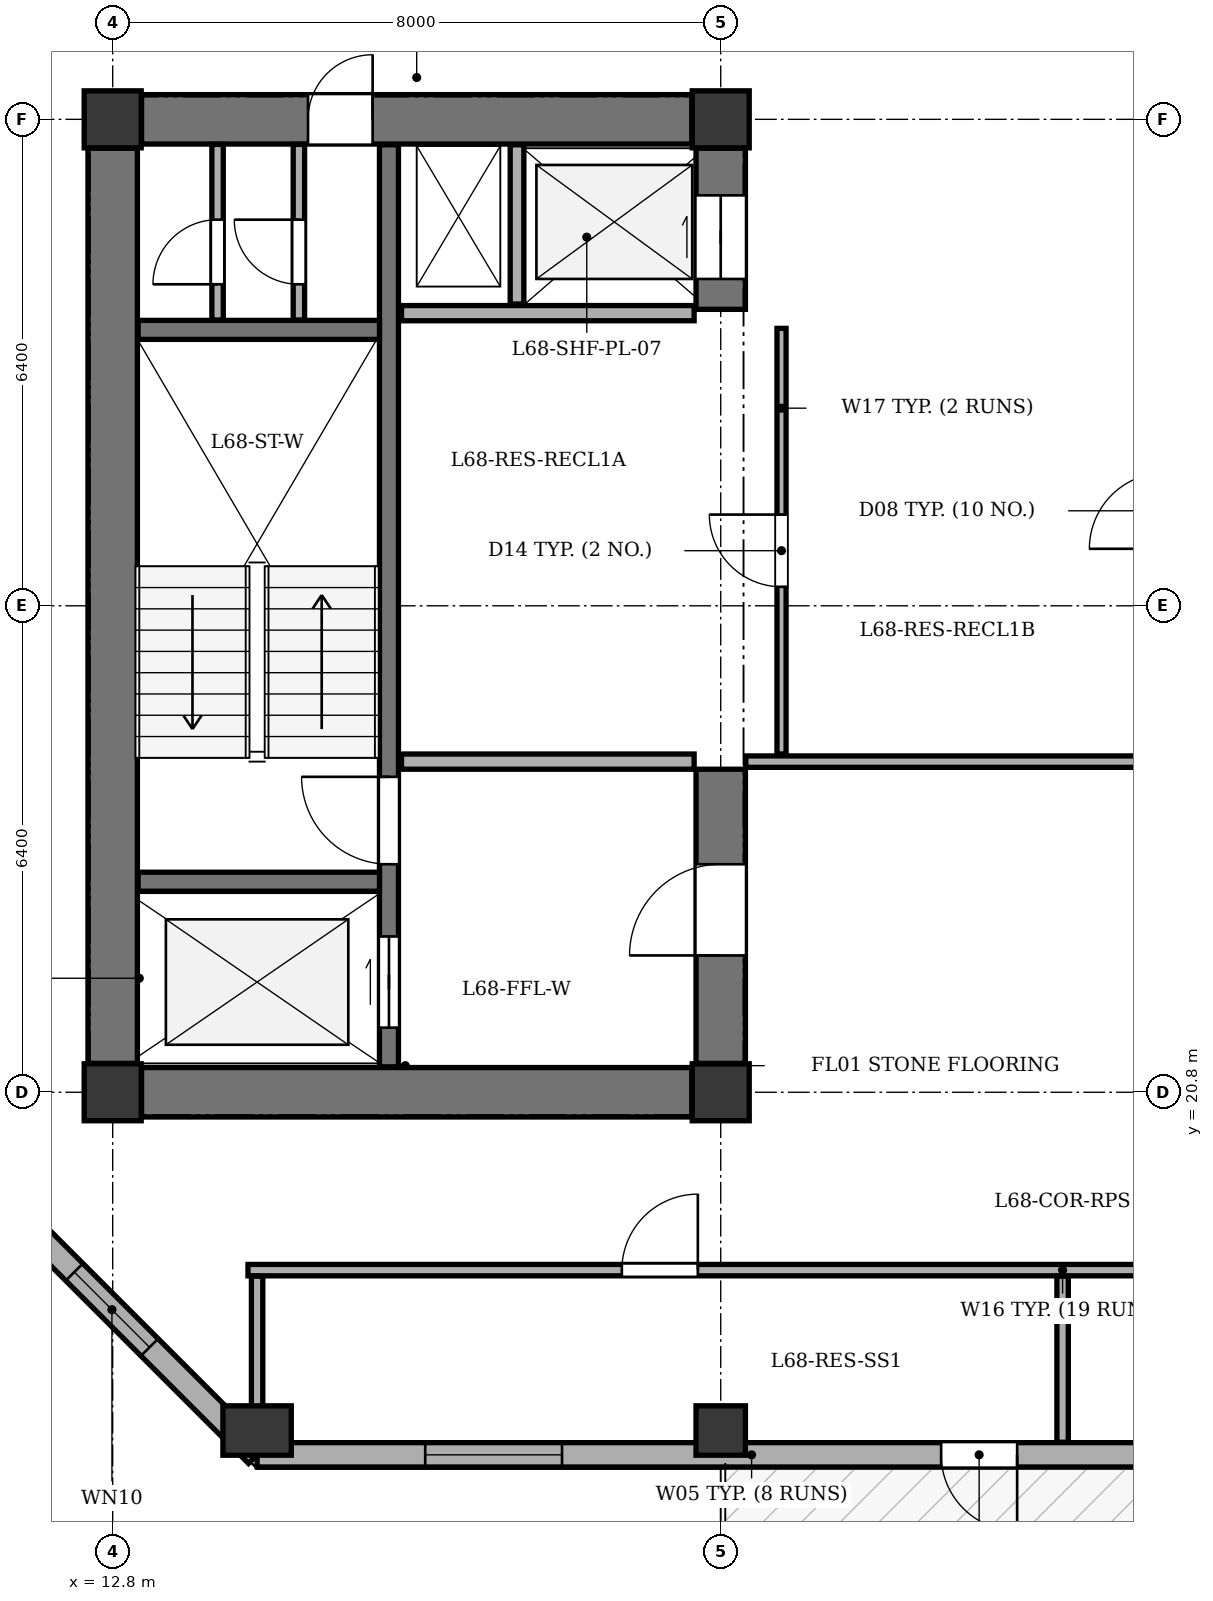
"""IFC4 building model, lengths in metres.
Left out: names, types, materials, properties, quantities, classifications, styles, units other than length and angle.
Written with IfcOpenShell. Run it as: python <this file> out.ifc"""

import sys

from ifc_helpers import new_model, si_unit, direction, frame, frame_2d, origin, origin_2d, place, context, subcontext, project, spatial, rectangle, extrude, element, fill, save


model = new_model("IFC4")
c1 = context("Model", 3, precision=1e-05, world=origin(), true_north=direction((0.0, 1.0)))
c2 = subcontext(c1, "Body", "Model", "MODEL_VIEW")
j1 = project(units=[si_unit("LENGTHUNIT", "METRE"), si_unit("PLANEANGLEUNIT", "RADIAN")], contexts=[c1])
p1 = place(None, origin())
s1 = spatial("IfcSite", under=j1, at=p1, CompositionType="ELEMENT")
p2 = place(p1, origin())
s2 = spatial("IfcBuilding", under=s1, at=p2, CompositionType="ELEMENT")
p3 = place(p2, frame((0.0, 0.0, 258.5)))
s3 = spatial("IfcBuildingStorey", under=s2, at=p3, CompositionType="ELEMENT", Elevation=258.5)
for number, where, z_axis, x_axis in (
    (1, (12.8, 20.8, 0.0), (0.0, 0.0, 1.0), (1.0, 0.0, 0.0)),
    (2, (20.8, 20.8, 0.0), (0.0, 0.0, 1.0), (1.0, 0.0, 0.0)),
    (3, (12.8, 33.6, 0.0), (0.0, 0.0, 1.0), (1.0, 0.0, 0.0)),
    (4, (20.8, 33.6, 0.0), (0.0, 0.0, 1.0), (1.0, 0.0, 0.0)),
):
    element("IfcColumn", number, at=place(p3, frame(where, z_axis=z_axis, x_axis=x_axis)), inside=s3, PredefinedType="COLUMN", context=c2, shape_type="SweptSolid", body=[
        extrude(rectangle(XDim=0.75, YDim=0.75, at=origin_2d()), origin(), (0.0, 0.0, 1.0), 3.4),
    ])
p4 = place(p3, frame((14.7, 16.35, 0.0), z_axis=(0.0, 0.0, 1.0), x_axis=(1.0, 0.0, 0.0)))
e5 = element("IfcColumn", 5, at=p4, inside=s3, PredefinedType="COLUMN", context=c2, shape_type="SweptSolid", body=[
    extrude(rectangle(XDim=0.65, YDim=0.9, at=origin_2d()), origin(), (0.0, 0.0, 1.0), 3.4),
])
p5 = place(p3, frame((20.8, 16.35, 0.0), z_axis=(0.0, 0.0, 1.0), x_axis=(1.0, 0.0, 0.0)))
e6 = element("IfcColumn", 6, at=p5, inside=s3, PredefinedType="COLUMN", context=c2, shape_type="SweptSolid", body=[
    extrude(rectangle(XDim=0.65, YDim=0.65, at=origin_2d()), origin(), (0.0, 0.0, 1.0), 3.4),
])
p6 = place(p3, frame((51.7, 16.03, 0.0), z_axis=(0.0, 0.0, 1.0), x_axis=(-1.0, 0.0, 0.0)))
e7 = element("IfcWall", 7, at=p6, inside=s3, PredefinedType="STANDARD", context=c2, shape_type="SweptSolid", body=[
    extrude(rectangle(XDim=37.0, YDim=0.32, at=frame_2d((18.5, 0.0))), origin(), (0.0, 0.0, 1.0), 2.725),
])
p7 = place(p6, frame((27.0, 0.0, 0.0)))
e8 = element("IfcOpeningElement", 8, at=p7, cuts=e7, PredefinedType="OPENING", context=c2, shape_type="SweptSolid", body=[
    extrude(rectangle(XDim=1.0, YDim=2.02, at=frame_2d((0.5, 1.01))), frame((0.0, 0.17, 0.0), z_axis=(0.0, -1.0, 0.0), x_axis=(1.0, 0.0, 0.0)), (0.0, 0.0, 1.0), 0.34),
])
p8 = place(p6, frame((1.235, 0.0, 0.75)))
e9 = element("IfcOpeningElement", 9, at=p8, cuts=e7, PredefinedType="OPENING", context=c2, shape_type="SweptSolid", body=[
    extrude(rectangle(XDim=1.8, YDim=1.7, at=frame_2d((0.9, 0.85))), frame((0.0, 0.17, 0.0), z_axis=(0.0, -1.0, 0.0), x_axis=(1.0, 0.0, 0.0)), (0.0, 0.0, 1.0), 0.34),
])
p9 = place(p6, frame((3.885, 0.0, 0.75)))
e10 = element("IfcOpeningElement", 10, at=p9, cuts=e7, PredefinedType="OPENING", context=c2, shape_type="SweptSolid", body=[
    extrude(rectangle(XDim=1.8, YDim=1.7, at=frame_2d((0.9, 0.85))), frame((0.0, 0.17, 0.0), z_axis=(0.0, -1.0, 0.0), x_axis=(1.0, 0.0, 0.0)), (0.0, 0.0, 1.0), 0.34),
])
p10 = place(p6, frame((8.422, 0.0, 0.75)))
e11 = element("IfcOpeningElement", 11, at=p10, cuts=e7, PredefinedType="OPENING", context=c2, shape_type="SweptSolid", body=[
    extrude(rectangle(XDim=1.8, YDim=1.7, at=frame_2d((0.9, 0.85))), frame((0.0, 0.17, 0.0), z_axis=(0.0, -1.0, 0.0), x_axis=(1.0, 0.0, 0.0)), (0.0, 0.0, 1.0), 0.34),
])
p11 = place(p6, frame((12.102, 0.0, 0.75)))
e12 = element("IfcOpeningElement", 12, at=p11, cuts=e7, PredefinedType="OPENING", context=c2, shape_type="SweptSolid", body=[
    extrude(rectangle(XDim=2.2, YDim=1.7, at=frame_2d((1.1, 0.85))), frame((0.0, 0.17, 0.0), z_axis=(0.0, -1.0, 0.0), x_axis=(1.0, 0.0, 0.0)), (0.0, 0.0, 1.0), 0.34),
])
p12 = place(p6, frame((17.748, 0.0, 0.75)))
e13 = element("IfcOpeningElement", 13, at=p12, cuts=e7, PredefinedType="OPENING", context=c2, shape_type="SweptSolid", body=[
    extrude(rectangle(XDim=1.8, YDim=1.7, at=frame_2d((0.9, 0.85))), frame((0.0, 0.17, 0.0), z_axis=(0.0, -1.0, 0.0), x_axis=(1.0, 0.0, 0.0)), (0.0, 0.0, 1.0), 0.34),
])
p13 = place(p6, frame((20.652, 0.0, 0.75)))
e14 = element("IfcOpeningElement", 14, at=p13, cuts=e7, PredefinedType="OPENING", context=c2, shape_type="SweptSolid", body=[
    extrude(rectangle(XDim=1.8, YDim=1.7, at=frame_2d((0.9, 0.85))), frame((0.0, 0.17, 0.0), z_axis=(0.0, -1.0, 0.0), x_axis=(1.0, 0.0, 0.0)), (0.0, 0.0, 1.0), 0.34),
])
p14 = place(p6, frame((32.988, 0.0, 0.75)))
e15 = element("IfcOpeningElement", 15, at=p14, cuts=e7, PredefinedType="OPENING", context=c2, shape_type="SweptSolid", body=[
    extrude(rectangle(XDim=1.8, YDim=1.7, at=frame_2d((0.9, 0.85))), frame((0.0, 0.17, 0.0), z_axis=(0.0, -1.0, 0.0), x_axis=(1.0, 0.0, 0.0)), (0.0, 0.0, 1.0), 0.34),
])
p15 = place(p3, frame((14.7, 16.03, 0.0), z_axis=(0.0, 0.0, 1.0), x_axis=(-0.707106781187, 0.707106781187, 0.0)))
e16 = element("IfcWall", 16, at=p15, inside=s3, PredefinedType="STANDARD", context=c2, shape_type="SweptSolid", body=[
    extrude(rectangle(XDim=5.402, YDim=0.32, at=frame_2d((2.701, 0.0))), origin(), (0.0, 0.0, 1.0), 2.725),
])
p16 = place(p15, frame((2.001, 0.0, 0.75)))
e17 = element("IfcOpeningElement", 17, at=p16, cuts=e16, PredefinedType="OPENING", context=c2, shape_type="SweptSolid", body=[
    extrude(rectangle(XDim=1.4, YDim=1.65, at=frame_2d((0.7, 0.825))), frame((0.0, 0.17, 0.0), z_axis=(0.0, -1.0, 0.0), x_axis=(1.0, 0.0, 0.0)), (0.0, 0.0, 1.0), 0.34),
])
p17 = place(p3, frame((12.8, 21.18, 0.0), z_axis=(0.0, 0.0, 1.0), x_axis=(0.0, 1.0, 0.0)))
e18 = element("IfcWall", 18, at=p17, inside=s3, PredefinedType="SHEAR", context=c2, shape_type="SweptSolid", body=[
    extrude(rectangle(XDim=12.04, YDim=0.65, at=frame_2d((6.02, 0.0))), origin(), (0.0, 0.0, 1.0), 3.1),
])
p18 = place(p3, frame((13.18, 20.8, 0.0), z_axis=(0.0, 0.0, 1.0), x_axis=(1.0, 0.0, 0.0)))
e19 = element("IfcWall", 19, at=p18, inside=s3, PredefinedType="SHEAR", context=c2, shape_type="SweptSolid", body=[
    extrude(rectangle(XDim=7.24, YDim=0.65, at=frame_2d((3.62, 0.0))), origin(), (0.0, 0.0, 1.0), 3.1),
])
p19 = place(p3, frame((13.18, 33.6, 0.0), z_axis=(0.0, 0.0, 1.0), x_axis=(1.0, 0.0, 0.0)))
e20 = element("IfcWall", 20, at=p19, inside=s3, PredefinedType="SHEAR", context=c2, shape_type="SweptSolid", body=[
    extrude(rectangle(XDim=7.24, YDim=0.65, at=frame_2d((3.62, 0.0))), origin(), (0.0, 0.0, 1.0), 3.1),
])
p20 = place(p19, frame((2.19, 0.0, 0.0)))
e21 = element("IfcOpeningElement", 21, at=p20, cuts=e20, PredefinedType="OPENING", context=c2, shape_type="SweptSolid", body=[
    extrude(rectangle(XDim=0.85, YDim=2.02, at=frame_2d((0.425, 1.01))), frame((0.0, 0.335, 0.0), z_axis=(0.0, -1.0, 0.0), x_axis=(1.0, 0.0, 0.0)), (0.0, 0.0, 1.0), 0.67),
])
p21 = place(p3, frame((20.8, 21.18, 0.0), z_axis=(0.0, 0.0, 1.0), x_axis=(0.0, 1.0, 0.0)))
e22 = element("IfcWall", 22, at=p21, inside=s3, PredefinedType="SHEAR", context=c2, shape_type="SweptSolid", body=[
    extrude(rectangle(XDim=3.87, YDim=0.65, at=frame_2d((1.935, 0.0))), origin(), (0.0, 0.0, 1.0), 3.1),
])
p22 = place(p21, frame((1.42, 0.0, 0.0)))
e23 = element("IfcOpeningElement", 23, at=p22, cuts=e22, PredefinedType="OPENING", context=c2, shape_type="SweptSolid", body=[
    extrude(rectangle(XDim=1.2, YDim=2.15, at=frame_2d((0.6, 1.075))), frame((0.0, 0.335, 0.0), z_axis=(0.0, -1.0, 0.0), x_axis=(1.0, 0.0, 0.0)), (0.0, 0.0, 1.0), 0.67),
])
p23 = place(p3, frame((20.8, 31.1, 0.0), z_axis=(0.0, 0.0, 1.0), x_axis=(0.0, 1.0, 0.0)))
e24 = element("IfcWall", 24, at=p23, inside=s3, PredefinedType="SHEAR", context=c2, shape_type="SweptSolid", body=[
    extrude(rectangle(XDim=2.12, YDim=0.65, at=frame_2d((1.06, 0.0))), origin(), (0.0, 0.0, 1.0), 3.1),
])
p24 = place(p23, frame((0.4, 0.0, 0.0)))
e25 = element("IfcOpeningElement", 25, at=p24, cuts=e24, PredefinedType="OPENING", context=c2, shape_type="SweptSolid", body=[
    extrude(rectangle(XDim=1.1, YDim=2.1, at=frame_2d((0.55, 1.05))), frame((0.0, 0.335, 0.0), z_axis=(0.0, -1.0, 0.0), x_axis=(1.0, 0.0, 0.0)), (0.0, 0.0, 1.0), 0.67),
])
p25 = place(p3, frame((16.435, 21.135, 0.0), z_axis=(0.0, 0.0, 1.0), x_axis=(0.0, 1.0, 0.0)))
e26 = element("IfcWall", 26, at=p25, inside=s3, PredefinedType="SHEAR", context=c2, shape_type="SweptSolid", body=[
    extrude(rectangle(XDim=12.13, YDim=0.25, at=frame_2d((6.065, 0.0))), origin(), (0.0, 0.0, 1.0), 3.1),
])
p26 = place(p25, frame((0.515, 0.0, 0.0)))
e27 = element("IfcOpeningElement", 27, at=p26, cuts=e26, PredefinedType="OPENING", context=c2, shape_type="SweptSolid", body=[
    extrude(rectangle(XDim=1.2, YDim=2.15, at=frame_2d((0.6, 1.075))), frame((0.0, 0.135, 0.0), z_axis=(0.0, -1.0, 0.0), x_axis=(1.0, 0.0, 0.0)), (0.0, 0.0, 1.0), 0.27),
])
p27 = place(p25, frame((2.665, 0.0, 0.0)))
e28 = element("IfcOpeningElement", 28, at=p27, cuts=e26, PredefinedType="OPENING", context=c2, shape_type="SweptSolid", body=[
    extrude(rectangle(XDim=1.15, YDim=2.15, at=frame_2d((0.575, 1.075))), frame((0.0, 0.135, 0.0), z_axis=(0.0, -1.0, 0.0), x_axis=(1.0, 0.0, 0.0)), (0.0, 0.0, 1.0), 0.27),
])
for number, where, z_axis, x_axis in (
    (29, (13.135, 23.57, 0.0), (0.0, 0.0, 1.0), (1.0, 0.0, 0.0)),
    (30, (13.135, 30.83, 0.0), (0.0, 0.0, 1.0), (1.0, 0.0, 0.0)),
):
    element("IfcWall", number, at=place(p3, frame(where, z_axis=z_axis, x_axis=x_axis)), inside=s3, PredefinedType="SHEAR", context=c2, shape_type="SweptSolid", body=[
        extrude(rectangle(XDim=3.175, YDim=0.25, at=frame_2d((1.587, 0.0))), origin(), (0.0, 0.0, 1.0), 3.1),
    ])
for number, where, z_axis, x_axis in (
    (31, (16.6, 25.15, 0.0), (0.0, 0.0, 1.0), (1.0, 0.0, 0.0)),
    (32, (16.6, 31.05, 0.0), (0.0, 0.0, 1.0), (1.0, 0.0, 0.0)),
):
    element("IfcWall", number, at=place(p3, frame(where, z_axis=z_axis, x_axis=x_axis)), inside=s3, PredefinedType="SOLIDWALL", context=c2, shape_type="SweptSolid", body=[
        extrude(rectangle(XDim=3.85, YDim=0.2, at=frame_2d((1.925, 0.0))), origin(), (0.0, 0.0, 1.0), 3.1),
    ])
p28 = place(p3, frame((18.12, 31.17, 0.0), z_axis=(0.0, 0.0, 1.0), x_axis=(0.0, 1.0, 0.0)))
e33 = element("IfcWall", 33, at=p28, inside=s3, PredefinedType="PARTITIONING", context=c2, shape_type="SweptSolid", body=[
    extrude(rectangle(XDim=2.095, YDim=0.18, at=frame_2d((1.047, 0.0))), origin(), (0.0, 0.0, 1.0), 3.1),
])
p29 = place(p3, frame((14.18, 30.96, 0.0), z_axis=(0.0, 0.0, 1.0), x_axis=(0.0, 1.0, 0.0)))
e34 = element("IfcWall", 34, at=p29, inside=s3, PredefinedType="PARTITIONING", context=c2, shape_type="SweptSolid", body=[
    extrude(rectangle(XDim=2.31, YDim=0.15, at=frame_2d((1.155, 0.0))), origin(), (0.0, 0.0, 1.0), 3.1),
])
p30 = place(p29, frame((0.47, 0.0, 0.0)))
e35 = element("IfcOpeningElement", 35, at=p30, cuts=e34, PredefinedType="OPENING", context=c2, shape_type="SweptSolid", body=[
    extrude(rectangle(XDim=0.85, YDim=2.02, at=frame_2d((0.425, 1.01))), frame((0.0, 0.085, 0.0), z_axis=(0.0, -1.0, 0.0), x_axis=(1.0, 0.0, 0.0)), (0.0, 0.0, 1.0), 0.17),
])
p31 = place(p3, frame((15.25, 30.96, 0.0), z_axis=(0.0, 0.0, 1.0), x_axis=(0.0, 1.0, 0.0)))
e36 = element("IfcWall", 36, at=p31, inside=s3, PredefinedType="PARTITIONING", context=c2, shape_type="SweptSolid", body=[
    extrude(rectangle(XDim=2.31, YDim=0.15, at=frame_2d((1.155, 0.0))), origin(), (0.0, 0.0, 1.0), 3.1),
])
p32 = place(p31, frame((0.47, 0.0, 0.0)))
e37 = element("IfcOpeningElement", 37, at=p32, cuts=e36, PredefinedType="OPENING", context=c2, shape_type="SweptSolid", body=[
    extrude(rectangle(XDim=0.85, YDim=2.02, at=frame_2d((0.425, 1.01))), frame((0.0, 0.085, 0.0), z_axis=(0.0, -1.0, 0.0), x_axis=(1.0, 0.0, 0.0)), (0.0, 0.0, 1.0), 0.17),
])
p33 = place(p3, frame((21.13, 25.15, 0.0), z_axis=(0.0, 0.0, 1.0), x_axis=(1.0, 0.0, 0.0)))
e38 = element("IfcWall", 38, at=p33, inside=s3, PredefinedType="PARTITIONING", context=c2, shape_type="SweptSolid", body=[
    extrude(rectangle(XDim=5.52, YDim=0.15, at=frame_2d((2.76, 0.0))), origin(), (0.0, 0.0, 1.0), 3.1),
])
p34 = place(p3, frame((21.6, 25.25, 0.0), z_axis=(0.0, 0.0, 1.0), x_axis=(0.0, 1.0, 0.0)))
e39 = element("IfcWall", 39, at=p34, inside=s3, PredefinedType="PARTITIONING", context=c2, shape_type="SweptSolid", body=[
    extrude(rectangle(XDim=5.6, YDim=0.12, at=frame_2d((2.8, 0.0))), origin(), (0.0, 0.0, 1.0), 3.1),
])
p35 = place(p34, frame((2.2, 0.0, 0.0)))
e40 = element("IfcOpeningElement", 40, at=p35, cuts=e39, PredefinedType="OPENING", context=c2, shape_type="SweptSolid", body=[
    extrude(rectangle(XDim=0.95, YDim=2.1, at=frame_2d((0.475, 1.05))), frame((0.0, 0.07, 0.0), z_axis=(0.0, -1.0, 0.0), x_axis=(1.0, 0.0, 0.0)), (0.0, 0.0, 1.0), 0.14),
])
p36 = place(p3, frame((14.58, 18.46, 0.0), z_axis=(0.0, 0.0, 1.0), x_axis=(1.0, 0.0, 0.0)))
e41 = element("IfcWall", 41, at=p36, inside=s3, PredefinedType="PARTITIONING", context=c2, shape_type="SweptSolid", body=[
    extrude(rectangle(XDim=30.52, YDim=0.15, at=frame_2d((15.26, 0.0))), origin(), (0.0, 0.0, 1.0), 3.1),
])
p37 = place(p36, frame((4.919, 0.0, 0.0)))
e42 = element("IfcOpeningElement", 42, at=p37, cuts=e41, PredefinedType="OPENING", context=c2, shape_type="SweptSolid", body=[
    extrude(rectangle(XDim=1.0, YDim=2.1, at=frame_2d((0.5, 1.05))), frame((0.0, 0.085, 0.0), z_axis=(0.0, -1.0, 0.0), x_axis=(1.0, 0.0, 0.0)), (0.0, 0.0, 1.0), 0.17),
])
p38 = place(p36, frame((15.517, 0.0, 0.0)))
e43 = element("IfcOpeningElement", 43, at=p38, cuts=e41, PredefinedType="OPENING", context=c2, shape_type="SweptSolid", body=[
    extrude(rectangle(XDim=1.0, YDim=2.1, at=frame_2d((0.5, 1.05))), frame((0.0, 0.085, 0.0), z_axis=(0.0, -1.0, 0.0), x_axis=(1.0, 0.0, 0.0)), (0.0, 0.0, 1.0), 0.17),
])
p39 = place(p36, frame((25.358, 0.0, 0.0)))
e44 = element("IfcOpeningElement", 44, at=p39, cuts=e41, PredefinedType="OPENING", context=c2, shape_type="SweptSolid", body=[
    extrude(rectangle(XDim=1.0, YDim=2.1, at=frame_2d((0.5, 1.05))), frame((0.0, 0.085, 0.0), z_axis=(0.0, -1.0, 0.0), x_axis=(1.0, 0.0, 0.0)), (0.0, 0.0, 1.0), 0.17),
])
for number, where, z_axis, x_axis in (
    (45, (14.7, 16.195, 0.0), (0.0, 0.0, 1.0), (0.0, 1.0, 0.0)),
    (46, (25.298, 16.195, 0.0), (0.0, 0.0, 1.0), (0.0, 1.0, 0.0)),
):
    element("IfcWall", number, at=place(p3, frame(where, z_axis=z_axis, x_axis=x_axis)), inside=s3, PredefinedType="PARTITIONING", context=c2, shape_type="SweptSolid", body=[
        extrude(rectangle(XDim=2.185, YDim=0.15, at=frame_2d((1.092, 0.0))), origin(), (0.0, 0.0, 1.0), 3.1),
    ])
p40 = place(p7, origin())
e47 = element("IfcDoor", 47, at=p40, inside=s3, OperationType="SINGLE_SWING_LEFT", PredefinedType="DOOR", context=c2, shape_type="SweptSolid", body=[
    extrude(rectangle(XDim=1.0, YDim=2.02, at=frame_2d((0.5, 1.01))), frame((0.0, 0.025, 0.0), z_axis=(0.0, -1.0, 0.0), x_axis=(1.0, 0.0, 0.0)), (0.0, 0.0, 1.0), 0.05),
])
fill(e8, e47)
p41 = place(p14, origin())
e48 = element("IfcWindow", 48, at=p41, inside=s3, PartitioningType="SINGLE_PANEL", PredefinedType="WINDOW", context=c2, shape_type="SweptSolid", body=[
    extrude(rectangle(XDim=1.8, YDim=1.7, at=frame_2d((0.9, 0.85))), frame((0.0, -0.01, 0.0), z_axis=(0.0, -1.0, 0.0), x_axis=(1.0, 0.0, 0.0)), (0.0, 0.0, 1.0), 0.06),
])
fill(e15, e48)
p42 = place(p16, origin())
e49 = element("IfcWindow", 49, at=p42, inside=s3, PartitioningType="SINGLE_PANEL", PredefinedType="WINDOW", context=c2, shape_type="SweptSolid", body=[
    extrude(rectangle(XDim=1.4, YDim=1.65, at=frame_2d((0.7, 0.825))), frame((0.0, -0.01, 0.0), z_axis=(0.0, -1.0, 0.0), x_axis=(1.0, 0.0, 0.0)), (0.0, 0.0, 1.0), 0.06),
])
fill(e17, e49)
p43 = place(p20, origin())
e50 = element("IfcDoor", 50, at=p43, inside=s3, OperationType="SINGLE_SWING_RIGHT", PredefinedType="DOOR", context=c2, shape_type="SweptSolid", body=[
    extrude(rectangle(XDim=0.85, YDim=2.02, at=frame_2d((0.425, 1.01))), frame((0.0, 0.025, 0.0), z_axis=(0.0, -1.0, 0.0), x_axis=(1.0, 0.0, 0.0)), (0.0, 0.0, 1.0), 0.05),
])
fill(e21, e50)
p44 = place(p22, origin())
e51 = element("IfcDoor", 51, at=p44, inside=s3, OperationType="SINGLE_SWING_LEFT", PredefinedType="DOOR", context=c2, shape_type="SweptSolid", body=[
    extrude(rectangle(XDim=1.2, YDim=2.15, at=frame_2d((0.6, 1.075))), frame((0.0, 0.025, 0.0), z_axis=(0.0, -1.0, 0.0), x_axis=(1.0, 0.0, 0.0)), (0.0, 0.0, 1.0), 0.05),
])
fill(e23, e51)
p45 = place(p24, origin())
e52 = element("IfcDoor", 52, at=p45, inside=s3, OperationType="DOUBLE_DOOR_SLIDING", PredefinedType="DOOR", context=c2, shape_type="SweptSolid", body=[
    extrude(rectangle(XDim=1.1, YDim=2.1, at=frame_2d((0.55, 1.05))), frame((0.0, 0.025, 0.0), z_axis=(0.0, -1.0, 0.0), x_axis=(1.0, 0.0, 0.0)), (0.0, 0.0, 1.0), 0.05),
])
fill(e25, e52)
p46 = place(p26, origin())
e53 = element("IfcDoor", 53, at=p46, inside=s3, OperationType="DOUBLE_DOOR_SLIDING", PredefinedType="DOOR", context=c2, shape_type="SweptSolid", body=[
    extrude(rectangle(XDim=1.2, YDim=2.15, at=frame_2d((0.6, 1.075))), frame((0.0, 0.025, 0.0), z_axis=(0.0, -1.0, 0.0), x_axis=(1.0, 0.0, 0.0)), (0.0, 0.0, 1.0), 0.05),
])
fill(e27, e53)
p47 = place(p27, origin())
e54 = element("IfcDoor", 54, at=p47, inside=s3, OperationType="SINGLE_SWING_RIGHT", PredefinedType="DOOR", context=c2, shape_type="SweptSolid", body=[
    extrude(rectangle(XDim=1.15, YDim=2.15, at=frame_2d((0.575, 1.075))), frame((0.0, 0.025, 0.0), z_axis=(0.0, -1.0, 0.0), x_axis=(1.0, 0.0, 0.0)), (0.0, 0.0, 1.0), 0.05),
])
fill(e28, e54)
p48 = place(p30, origin())
e55 = element("IfcDoor", 55, at=p48, inside=s3, OperationType="SINGLE_SWING_LEFT", PredefinedType="DOOR", context=c2, shape_type="SweptSolid", body=[
    extrude(rectangle(XDim=0.85, YDim=2.02, at=frame_2d((0.425, 1.01))), frame((0.0, 0.025, 0.0), z_axis=(0.0, -1.0, 0.0), x_axis=(1.0, 0.0, 0.0)), (0.0, 0.0, 1.0), 0.05),
])
fill(e35, e55)
p49 = place(p32, origin())
e56 = element("IfcDoor", 56, at=p49, inside=s3, OperationType="SINGLE_SWING_RIGHT", PredefinedType="DOOR", context=c2, shape_type="SweptSolid", body=[
    extrude(rectangle(XDim=0.85, YDim=2.02, at=frame_2d((0.425, 1.01))), frame((0.0, 0.025, 0.0), z_axis=(0.0, -1.0, 0.0), x_axis=(1.0, 0.0, 0.0)), (0.0, 0.0, 1.0), 0.05),
])
fill(e37, e56)
p50 = place(p35, origin())
e57 = element("IfcDoor", 57, at=p50, inside=s3, OperationType="SINGLE_SWING_RIGHT", PredefinedType="DOOR", context=c2, shape_type="SweptSolid", body=[
    extrude(rectangle(XDim=0.95, YDim=2.1, at=frame_2d((0.475, 1.05))), frame((0.0, 0.025, 0.0), z_axis=(0.0, -1.0, 0.0), x_axis=(1.0, 0.0, 0.0)), (0.0, 0.0, 1.0), 0.05),
])
fill(e40, e57)
p51 = place(p37, origin())
e58 = element("IfcDoor", 58, at=p51, inside=s3, OperationType="SINGLE_SWING_RIGHT", PredefinedType="DOOR", context=c2, shape_type="SweptSolid", body=[
    extrude(rectangle(XDim=1.0, YDim=2.1, at=frame_2d((0.5, 1.05))), frame((0.0, 0.025, 0.0), z_axis=(0.0, -1.0, 0.0), x_axis=(1.0, 0.0, 0.0)), (0.0, 0.0, 1.0), 0.05),
])
fill(e42, e58)
save(model, sys.argv[1])
